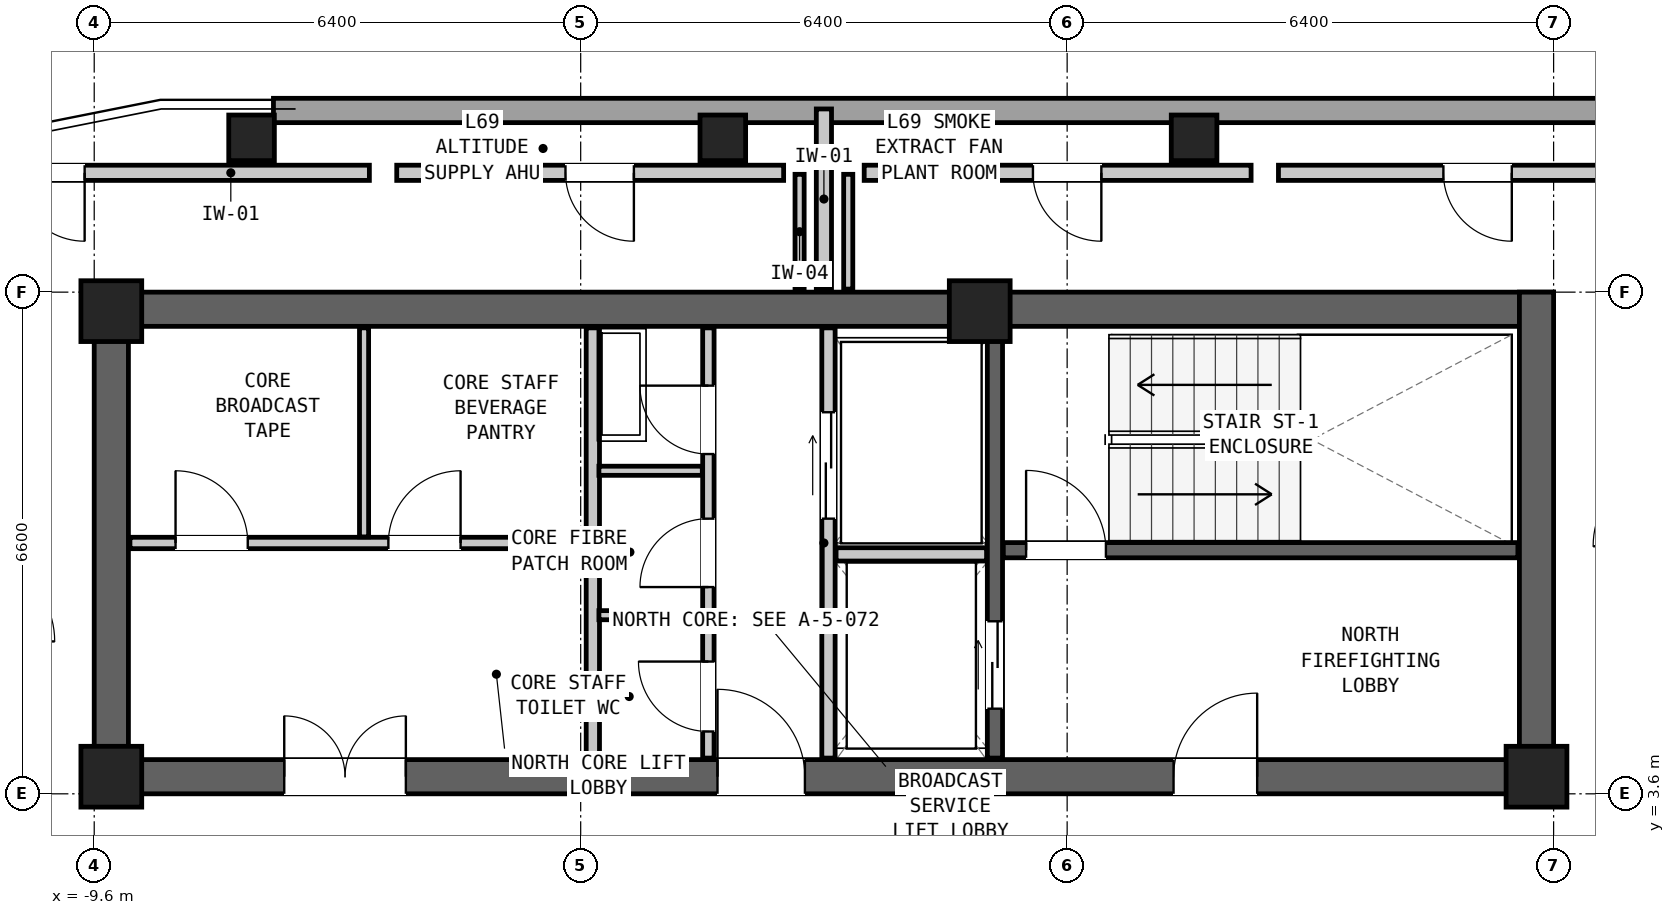
"""IFC4 building model, lengths in metres.
Left out: names, types, materials, properties, quantities, classifications, styles, units other than length and angle.
Written with IfcOpenShell. Run it as: python <this file> out.ifc"""

import sys

from ifc_helpers import new_model, si_unit, direction, frame, frame_2d, origin, origin_2d, place, context, subcontext, project, spatial, rectangle, hollow_rectangle, extrude, element, fill, save


model = new_model("IFC4")
c1 = context("Model", 3, precision=1e-05, world=origin(), true_north=direction((0.0, 1.0)))
c2 = subcontext(c1, "Body", "Model", "MODEL_VIEW")
j1 = project(units=[si_unit("LENGTHUNIT", "METRE"), si_unit("PLANEANGLEUNIT", "RADIAN")], contexts=[c1])
p1 = place(None, origin())
s1 = spatial("IfcSite", under=j1, at=p1, CompositionType="ELEMENT")
p2 = place(p1, origin())
s2 = spatial("IfcBuilding", under=s1, at=p2, CompositionType="ELEMENT")
p3 = place(p2, frame((0.0, 0.0, 234.9)))
s3 = spatial("IfcBuildingStorey", under=s2, at=p3, CompositionType="ELEMENT", Elevation=234.9)
p4 = place(p3, frame((-9.6, 9.975, 0.0), z_axis=(0.0, 0.0, 1.0), x_axis=(1.0, 0.0, 0.0)))
e1 = element("IfcWall", 1, at=p4, inside=s3, PredefinedType="SHEAR", context=c2, shape_type="SweptSolid", body=[
    extrude(rectangle(XDim=19.2, YDim=0.45, at=frame_2d((9.6, 0.0))), origin(), (0.0, 0.0, 1.0), 3.6),
])
p5 = place(p3, frame((-9.6, 3.825, 0.0), z_axis=(0.0, 0.0, 1.0), x_axis=(1.0, 0.0, 0.0)))
e2 = element("IfcWall", 2, at=p5, inside=s3, PredefinedType="SHEAR", context=c2, shape_type="SweptSolid", body=[
    extrude(rectangle(XDim=19.2, YDim=0.45, at=frame_2d((9.6, 0.0))), origin(), (0.0, 0.0, 1.0), 3.6),
])
p6 = place(p5, frame((14.2, 0.0, 0.0)))
e3 = element("IfcOpeningElement", 3, at=p6, cuts=e2, PredefinedType="OPENING", context=c2, shape_type="SweptSolid", body=[
    extrude(rectangle(XDim=1.1, YDim=2.08, at=frame_2d((0.55, 1.04))), frame((0.0, 0.237, 0.0), z_axis=(0.0, -1.0, 0.0), x_axis=(1.0, 0.0, 0.0)), (0.0, 0.0, 1.0), 0.474),
])
p7 = place(p5, frame((8.2, 0.0, 0.0)))
e4 = element("IfcOpeningElement", 4, at=p7, cuts=e2, PredefinedType="OPENING", context=c2, shape_type="SweptSolid", body=[
    extrude(rectangle(XDim=1.15, YDim=2.1, at=frame_2d((0.575, 1.05))), frame((0.0, 0.237, 0.0), z_axis=(0.0, -1.0, 0.0), x_axis=(1.0, 0.0, 0.0)), (0.0, 0.0, 1.0), 0.474),
])
p8 = place(p5, frame((2.5, 0.0, 0.0)))
e5 = element("IfcOpeningElement", 5, at=p8, cuts=e2, PredefinedType="OPENING", context=c2, shape_type="SweptSolid", body=[
    extrude(rectangle(XDim=1.6, YDim=2.12, at=frame_2d((0.8, 1.06))), frame((0.0, 0.237, 0.0), z_axis=(0.0, -1.0, 0.0), x_axis=(1.0, 0.0, 0.0)), (0.0, 0.0, 1.0), 0.474),
])
for number, where, z_axis, x_axis in (
    (6, (-9.375, 3.6, 0.0), (0.0, 0.0, 1.0), (0.0, 1.0, 0.0)),
    (7, (9.375, 3.6, 0.0), (0.0, 0.0, 1.0), (0.0, 1.0, 0.0)),
):
    element("IfcWall", number, at=place(p3, frame(where, z_axis=z_axis, x_axis=x_axis)), inside=s3, PredefinedType="SHEAR", context=c2, shape_type="SweptSolid", body=[
        extrude(rectangle(XDim=6.6, YDim=0.45, at=frame_2d((3.3, 0.0))), origin(), (0.0, 0.0, 1.0), 3.6),
    ])
for number, where, z_axis, x_axis in (
    (8, (4.87, 12.23, 0.0), (0.0, 0.0, 1.0), (1.0, 0.0, 0.0)),
    (9, (-1.33, 12.23, 0.0), (0.0, 0.0, 1.0), (1.0, 0.0, 0.0)),
    (10, (-7.53, 12.23, 0.0), (0.0, 0.0, 1.0), (1.0, 0.0, 0.0)),
):
    element("IfcColumn", number, at=place(p3, frame(where, z_axis=z_axis, x_axis=x_axis)), inside=s3, PredefinedType="COLUMN", context=c2, shape_type="SweptSolid", body=[
        extrude(hollow_rectangle(XDim=0.6, YDim=0.6, WallThickness=0.04, at=origin_2d()), origin(), (0.0, 0.0, 1.0), 3.6),
    ])
for number, where, z_axis, x_axis in (
    (11, (-9.375, 9.95, 0.0), (0.0, 0.0, 1.0), (1.0, 0.0, 0.0)),
    (12, (2.05, 9.95, 0.0), (0.0, 0.0, 1.0), (1.0, 0.0, 0.0)),
    (13, (-9.375, 3.825, 0.0), (0.0, 0.0, 1.0), (1.0, 0.0, 0.0)),
    (14, (9.375, 3.825, 0.0), (0.0, 0.0, 1.0), (1.0, 0.0, 0.0)),
):
    element("IfcColumn", number, at=place(p3, frame(where, z_axis=z_axis, x_axis=x_axis)), inside=s3, PredefinedType="COLUMN", context=c2, shape_type="SweptSolid", body=[
        extrude(rectangle(XDim=0.8, YDim=0.8, at=origin_2d()), origin(), (0.0, 0.0, 1.0), 3.6),
    ])
p9 = place(p3, frame((-7.242, 12.59, 0.0), z_axis=(0.0, 0.0, 1.0), x_axis=(1.0, 0.0, 0.0)))
e15 = element("IfcWall", 15, at=p9, inside=s3, PredefinedType="SOLIDWALL", context=c2, shape_type="SweptSolid", body=[
    extrude(rectangle(XDim=18.024, YDim=0.32, at=frame_2d((9.012, 0.0))), origin(), (0.0, 0.0, 1.0), 2.082),
])
p10 = place(p3, frame((2.36, 6.805, 0.0), z_axis=(0.0, 0.0, 1.0), x_axis=(1.0, 0.0, 0.0)))
e16 = element("IfcWall", 16, at=p10, inside=s3, PredefinedType="SHEAR", context=c2, shape_type="SweptSolid", body=[
    extrude(rectangle(XDim=6.77, YDim=0.2, at=frame_2d((3.385, 0.0))), origin(), (0.0, 0.0, 1.0), 3.22),
])
p11 = place(p10, frame((0.3, 0.0, 0.0)))
e17 = element("IfcOpeningElement", 17, at=p11, cuts=e16, PredefinedType="OPENING", context=c2, shape_type="SweptSolid", body=[
    extrude(rectangle(XDim=1.05, YDim=2.08, at=frame_2d((0.525, 1.04))), frame((0.0, 0.112, 0.0), z_axis=(0.0, -1.0, 0.0), x_axis=(1.0, 0.0, 0.0)), (0.0, 0.0, 1.0), 0.224),
])
p12 = place(p3, frame((2.25, 4.07, 0.0), z_axis=(0.0, 0.0, 1.0), x_axis=(0.0, 1.0, 0.0)))
e18 = element("IfcWall", 18, at=p12, inside=s3, PredefinedType="SHEAR", context=c2, shape_type="SweptSolid", body=[
    extrude(rectangle(XDim=5.66, YDim=0.2, at=frame_2d((2.83, 0.0))), origin(), (0.0, 0.0, 1.0), 3.22),
])
p13 = place(p12, frame((0.65, 0.0, 0.0)))
e19 = element("IfcOpeningElement", 19, at=p13, cuts=e18, PredefinedType="OPENING", context=c2, shape_type="SweptSolid", body=[
    extrude(rectangle(XDim=1.15, YDim=2.08, at=frame_2d((0.575, 1.04))), frame((0.0, 0.112, 0.0), z_axis=(0.0, -1.0, 0.0), x_axis=(1.0, 0.0, 0.0)), (0.0, 0.0, 1.0), 0.224),
])
p14 = place(p3, frame((0.06, 4.07, 0.0), z_axis=(0.0, 0.0, 1.0), x_axis=(0.0, 1.0, 0.0)))
e20 = element("IfcWall", 20, at=p14, inside=s3, PredefinedType="PARTITIONING", context=c2, shape_type="SweptSolid", body=[
    extrude(rectangle(XDim=5.66, YDim=0.175, at=frame_2d((2.83, 0.0))), origin(), (0.0, 0.0, 1.0), 3.22),
])
p15 = place(p14, frame((3.15, 0.0, 0.0)))
e21 = element("IfcOpeningElement", 21, at=p15, cuts=e20, PredefinedType="OPENING", context=c2, shape_type="SweptSolid", body=[
    extrude(rectangle(XDim=1.4, YDim=2.12, at=frame_2d((0.7, 1.06))), frame((0.0, 0.1, 0.0), z_axis=(0.0, -1.0, 0.0), x_axis=(1.0, 0.0, 0.0)), (0.0, 0.0, 1.0), 0.199),
])
p16 = place(p3, frame((0.16, 6.75, 0.0), z_axis=(0.0, 0.0, 1.0), x_axis=(1.0, 0.0, 0.0)))
e22 = element("IfcWall", 22, at=p16, inside=s3, PredefinedType="PARTITIONING", context=c2, shape_type="SweptSolid", body=[
    extrude(rectangle(XDim=1.98, YDim=0.175, at=frame_2d((0.99, 0.0))), origin(), (0.0, 0.0, 1.0), 3.22),
])
p17 = place(p3, frame((-3.04, 4.07, 0.0), z_axis=(0.0, 0.0, 1.0), x_axis=(0.0, 1.0, 0.0)))
e23 = element("IfcWall", 23, at=p17, inside=s3, PredefinedType="PARTITIONING", context=c2, shape_type="SweptSolid", body=[
    extrude(rectangle(XDim=5.66, YDim=0.175, at=frame_2d((2.83, 0.0))), origin(), (0.0, 0.0, 1.0), 3.22),
])
p18 = place(p3, frame((-1.52, 4.07, 0.0), z_axis=(0.0, 0.0, 1.0), x_axis=(0.0, 1.0, 0.0)))
e24 = element("IfcWall", 24, at=p18, inside=s3, PredefinedType="PARTITIONING", context=c2, shape_type="SweptSolid", body=[
    extrude(rectangle(XDim=5.66, YDim=0.15, at=frame_2d((2.83, 0.0))), origin(), (0.0, 0.0, 1.0), 3.22),
])
p19 = place(p18, frame((4.0, 0.0, 0.0)))
e25 = element("IfcOpeningElement", 25, at=p19, cuts=e24, PredefinedType="OPENING", context=c2, shape_type="SweptSolid", body=[
    extrude(rectangle(XDim=0.9, YDim=2.05, at=frame_2d((0.45, 1.025))), frame((0.0, 0.087, 0.0), z_axis=(0.0, -1.0, 0.0), x_axis=(1.0, 0.0, 0.0)), (0.0, 0.0, 1.0), 0.174),
])
p20 = place(p18, frame((2.25, 0.0, 0.0)))
e26 = element("IfcOpeningElement", 26, at=p20, cuts=e24, PredefinedType="OPENING", context=c2, shape_type="SweptSolid", body=[
    extrude(rectangle(XDim=0.9, YDim=2.05, at=frame_2d((0.45, 1.025))), frame((0.0, 0.087, 0.0), z_axis=(0.0, -1.0, 0.0), x_axis=(1.0, 0.0, 0.0)), (0.0, 0.0, 1.0), 0.174),
])
p21 = place(p18, frame((0.35, 0.0, 0.0)))
e27 = element("IfcOpeningElement", 27, at=p21, cuts=e24, PredefinedType="OPENING", context=c2, shape_type="SweptSolid", body=[
    extrude(rectangle(XDim=0.92, YDim=2.1, at=frame_2d((0.46, 1.05))), frame((0.0, 0.087, 0.0), z_axis=(0.0, -1.0, 0.0), x_axis=(1.0, 0.0, 0.0)), (0.0, 0.0, 1.0), 0.174),
])
for number, where, z_axis, x_axis in (
    (28, (-2.96, 5.95, 0.0), (0.0, 0.0, 1.0), (1.0, 0.0, 0.0)),
    (29, (-2.96, 7.85, 0.0), (0.0, 0.0, 1.0), (1.0, 0.0, 0.0)),
):
    element("IfcWall", number, at=place(p3, frame(where, z_axis=z_axis, x_axis=x_axis)), inside=s3, PredefinedType="PARTITIONING", context=c2, shape_type="SweptSolid", body=[
        extrude(rectangle(XDim=1.36, YDim=0.12, at=frame_2d((0.68, 0.0))), origin(), (0.0, 0.0, 1.0), 3.22),
    ])
p22 = place(p3, frame((-9.13, 6.9, 0.0), z_axis=(0.0, 0.0, 1.0), x_axis=(1.0, 0.0, 0.0)))
e30 = element("IfcWall", 30, at=p22, inside=s3, PredefinedType="PARTITIONING", context=c2, shape_type="SweptSolid", body=[
    extrude(rectangle(XDim=6.01, YDim=0.15, at=frame_2d((3.005, 0.0))), origin(), (0.0, 0.0, 1.0), 3.22),
])
p23 = place(p22, frame((0.6, 0.0, 0.0)))
e31 = element("IfcOpeningElement", 31, at=p23, cuts=e30, PredefinedType="OPENING", context=c2, shape_type="SweptSolid", body=[
    extrude(rectangle(XDim=0.95, YDim=2.1, at=frame_2d((0.475, 1.05))), frame((0.0, 0.087, 0.0), z_axis=(0.0, -1.0, 0.0), x_axis=(1.0, 0.0, 0.0)), (0.0, 0.0, 1.0), 0.174),
])
p24 = place(p22, frame((3.4, 0.0, 0.0)))
e32 = element("IfcOpeningElement", 32, at=p24, cuts=e30, PredefinedType="OPENING", context=c2, shape_type="SweptSolid", body=[
    extrude(rectangle(XDim=0.95, YDim=2.1, at=frame_2d((0.475, 1.05))), frame((0.0, 0.087, 0.0), z_axis=(0.0, -1.0, 0.0), x_axis=(1.0, 0.0, 0.0)), (0.0, 0.0, 1.0), 0.174),
])
p25 = place(p3, frame((-6.05, 6.98, 0.0), z_axis=(0.0, 0.0, 1.0), x_axis=(0.0, 1.0, 0.0)))
e33 = element("IfcWall", 33, at=p25, inside=s3, PredefinedType="PARTITIONING", context=c2, shape_type="SweptSolid", body=[
    extrude(rectangle(XDim=2.75, YDim=0.12, at=frame_2d((1.375, 0.0))), origin(), (0.0, 0.0, 1.0), 3.22),
])
p26 = place(p3, frame((0.0, 10.24, 0.0), z_axis=(0.0, 0.0, 1.0), x_axis=(0.0, 1.0, 0.0)))
e34 = element("IfcWall", 34, at=p26, inside=s3, PredefinedType="PARTITIONING", context=c2, shape_type="SweptSolid", body=[
    extrude(rectangle(XDim=2.37, YDim=0.2, at=frame_2d((1.185, 0.0))), origin(), (0.0, 0.0, 1.0), 2.438),
])
for number, where, z_axis, x_axis in (
    (35, (-0.32, 10.24, 0.0), (0.0, 0.0, 1.0), (0.0, 1.0, 0.0)),
    (36, (0.32, 10.24, 0.0), (0.0, 0.0, 1.0), (0.0, 1.0, 0.0)),
):
    element("IfcWall", number, at=place(p3, frame(where, z_axis=z_axis, x_axis=x_axis)), inside=s3, PredefinedType="PARTITIONING", context=c2, shape_type="SweptSolid", body=[
        extrude(rectangle(XDim=1.51, YDim=0.12, at=frame_2d((0.755, 0.0))), origin(), (0.0, 0.0, 1.0), 2.438),
    ])
p27 = place(p3, frame((-5.98, 11.77, 0.0), z_axis=(0.0, 0.0, 1.0), x_axis=(-1.0, 0.0, 0.0)))
e37 = element("IfcWall", 37, at=p27, inside=s3, PredefinedType="PARTITIONING", context=c2, shape_type="SweptSolid", body=[
    extrude(rectangle(XDim=5.046, YDim=0.2, at=frame_2d((2.523, 0.0))), origin(), (0.0, 0.0, 1.0), 2.082),
])
p28 = place(p27, frame((3.746, 0.0, 0.0)))
e38 = element("IfcOpeningElement", 38, at=p28, cuts=e37, PredefinedType="OPENING", context=c2, shape_type="SweptSolid", body=[
    extrude(rectangle(XDim=0.9, YDim=2.05, at=frame_2d((0.45, 1.025))), frame((0.0, 0.112, 0.0), z_axis=(0.0, -1.0, 0.0), x_axis=(1.0, 0.0, 0.0)), (0.0, 0.0, 1.0), 0.224),
])
p29 = place(p3, frame((-0.53, 11.77, 0.0), z_axis=(0.0, 0.0, 1.0), x_axis=(-1.0, 0.0, 0.0)))
e39 = element("IfcWall", 39, at=p29, inside=s3, PredefinedType="PARTITIONING", context=c2, shape_type="SweptSolid", body=[
    extrude(rectangle(XDim=5.09, YDim=0.2, at=frame_2d((2.545, 0.0))), origin(), (0.0, 0.0, 1.0), 2.082),
])
p30 = place(p29, frame((1.97, 0.0, 0.0)))
e40 = element("IfcOpeningElement", 40, at=p30, cuts=e39, PredefinedType="OPENING", context=c2, shape_type="SweptSolid", body=[
    extrude(rectangle(XDim=0.9, YDim=2.05, at=frame_2d((0.45, 1.025))), frame((0.0, 0.112, 0.0), z_axis=(0.0, -1.0, 0.0), x_axis=(1.0, 0.0, 0.0)), (0.0, 0.0, 1.0), 0.224),
])
p31 = place(p3, frame((5.62, 11.77, 0.0), z_axis=(0.0, 0.0, 1.0), x_axis=(-1.0, 0.0, 0.0)))
e41 = element("IfcWall", 41, at=p31, inside=s3, PredefinedType="PARTITIONING", context=c2, shape_type="SweptSolid", body=[
    extrude(rectangle(XDim=5.09, YDim=0.2, at=frame_2d((2.545, 0.0))), origin(), (0.0, 0.0, 1.0), 2.082),
])
p32 = place(p31, frame((1.97, 0.0, 0.0)))
e42 = element("IfcOpeningElement", 42, at=p32, cuts=e41, PredefinedType="OPENING", context=c2, shape_type="SweptSolid", body=[
    extrude(rectangle(XDim=0.9, YDim=2.05, at=frame_2d((0.45, 1.025))), frame((0.0, 0.112, 0.0), z_axis=(0.0, -1.0, 0.0), x_axis=(1.0, 0.0, 0.0)), (0.0, 0.0, 1.0), 0.224),
])
p33 = place(p3, frame((10.97, 11.77, 0.0), z_axis=(0.0, 0.0, 1.0), x_axis=(-1.0, 0.0, 0.0)))
e43 = element("IfcWall", 43, at=p33, inside=s3, PredefinedType="PARTITIONING", context=c2, shape_type="SweptSolid", body=[
    extrude(rectangle(XDim=4.99, YDim=0.2, at=frame_2d((2.495, 0.0))), origin(), (0.0, 0.0, 1.0), 2.082),
])
p34 = place(p33, frame((1.92, 0.0, 0.0)))
e44 = element("IfcOpeningElement", 44, at=p34, cuts=e43, PredefinedType="OPENING", context=c2, shape_type="SweptSolid", body=[
    extrude(rectangle(XDim=0.9, YDim=2.05, at=frame_2d((0.45, 1.025))), frame((0.0, 0.112, 0.0), z_axis=(0.0, -1.0, 0.0), x_axis=(1.0, 0.0, 0.0)), (0.0, 0.0, 1.0), 0.224),
])
p35 = place(p11, origin())
e45 = element("IfcDoor", 45, at=p35, inside=s3, OperationType="SINGLE_SWING_LEFT", PredefinedType="DOOR", context=c2, shape_type="SweptSolid", body=[
    extrude(rectangle(XDim=1.05, YDim=2.08, at=frame_2d((0.525, 1.04))), frame((0.0, 0.025, 0.0), z_axis=(0.0, -1.0, 0.0), x_axis=(1.0, 0.0, 0.0)), (0.0, 0.0, 1.0), 0.05),
])
fill(e17, e45)
p36 = place(p6, origin())
e46 = element("IfcDoor", 46, at=p36, inside=s3, OperationType="SINGLE_SWING_RIGHT", PredefinedType="DOOR", context=c2, shape_type="SweptSolid", body=[
    extrude(rectangle(XDim=1.1, YDim=2.08, at=frame_2d((0.55, 1.04))), frame((0.0, 0.025, 0.0), z_axis=(0.0, -1.0, 0.0), x_axis=(1.0, 0.0, 0.0)), (0.0, 0.0, 1.0), 0.05),
])
fill(e3, e46)
p37 = place(p13, origin())
e47 = element("IfcDoor", 47, at=p37, inside=s3, OperationType="DOUBLE_DOOR_SLIDING", PredefinedType="DOOR", context=c2, shape_type="SweptSolid", body=[
    extrude(rectangle(XDim=1.15, YDim=2.08, at=frame_2d((0.575, 1.04))), frame((0.0, 0.025, 0.0), z_axis=(0.0, -1.0, 0.0), x_axis=(1.0, 0.0, 0.0)), (0.0, 0.0, 1.0), 0.05),
])
fill(e19, e47)
p38 = place(p15, origin())
e48 = element("IfcDoor", 48, at=p38, inside=s3, OperationType="DOUBLE_DOOR_SLIDING", PredefinedType="DOOR", context=c2, shape_type="SweptSolid", body=[
    extrude(rectangle(XDim=1.4, YDim=2.12, at=frame_2d((0.7, 1.06))), frame((0.0, 0.025, 0.0), z_axis=(0.0, -1.0, 0.0), x_axis=(1.0, 0.0, 0.0)), (0.0, 0.0, 1.0), 0.05),
])
fill(e21, e48)
p39 = place(p7, origin())
e49 = element("IfcDoor", 49, at=p39, inside=s3, OperationType="SINGLE_SWING_LEFT", PredefinedType="DOOR", context=c2, shape_type="SweptSolid", body=[
    extrude(rectangle(XDim=1.15, YDim=2.1, at=frame_2d((0.575, 1.05))), frame((0.0, 0.025, 0.0), z_axis=(0.0, -1.0, 0.0), x_axis=(1.0, 0.0, 0.0)), (0.0, 0.0, 1.0), 0.05),
])
fill(e4, e49)
p40 = place(p19, origin())
e50 = element("IfcDoor", 50, at=p40, inside=s3, OperationType="SINGLE_SWING_RIGHT", PredefinedType="DOOR", context=c2, shape_type="SweptSolid", body=[
    extrude(rectangle(XDim=0.9, YDim=2.05, at=frame_2d((0.45, 1.025))), frame((0.0, 0.025, 0.0), z_axis=(0.0, -1.0, 0.0), x_axis=(1.0, 0.0, 0.0)), (0.0, 0.0, 1.0), 0.05),
])
fill(e25, e50)
p41 = place(p20, origin())
e51 = element("IfcDoor", 51, at=p41, inside=s3, OperationType="SINGLE_SWING_LEFT", PredefinedType="DOOR", context=c2, shape_type="SweptSolid", body=[
    extrude(rectangle(XDim=0.9, YDim=2.05, at=frame_2d((0.45, 1.025))), frame((0.0, 0.025, 0.0), z_axis=(0.0, -1.0, 0.0), x_axis=(1.0, 0.0, 0.0)), (0.0, 0.0, 1.0), 0.05),
])
fill(e26, e51)
p42 = place(p21, origin())
e52 = element("IfcDoor", 52, at=p42, inside=s3, OperationType="SINGLE_SWING_RIGHT", PredefinedType="DOOR", context=c2, shape_type="SweptSolid", body=[
    extrude(rectangle(XDim=0.92, YDim=2.1, at=frame_2d((0.46, 1.05))), frame((0.0, 0.025, 0.0), z_axis=(0.0, -1.0, 0.0), x_axis=(1.0, 0.0, 0.0)), (0.0, 0.0, 1.0), 0.05),
])
fill(e27, e52)
p43 = place(p8, origin())
e53 = element("IfcDoor", 53, at=p43, inside=s3, OperationType="DOUBLE_DOOR_SINGLE_SWING", PredefinedType="DOOR", context=c2, shape_type="SweptSolid", body=[
    extrude(rectangle(XDim=1.6, YDim=2.12, at=frame_2d((0.8, 1.06))), frame((0.0, 0.025, 0.0), z_axis=(0.0, -1.0, 0.0), x_axis=(1.0, 0.0, 0.0)), (0.0, 0.0, 1.0), 0.05),
])
fill(e5, e53)
p44 = place(p23, origin())
e54 = element("IfcDoor", 54, at=p44, inside=s3, OperationType="SINGLE_SWING_LEFT", PredefinedType="DOOR", context=c2, shape_type="SweptSolid", body=[
    extrude(rectangle(XDim=0.95, YDim=2.1, at=frame_2d((0.475, 1.05))), frame((0.0, 0.025, 0.0), z_axis=(0.0, -1.0, 0.0), x_axis=(1.0, 0.0, 0.0)), (0.0, 0.0, 1.0), 0.05),
])
fill(e31, e54)
p45 = place(p24, origin())
e55 = element("IfcDoor", 55, at=p45, inside=s3, OperationType="SINGLE_SWING_RIGHT", PredefinedType="DOOR", context=c2, shape_type="SweptSolid", body=[
    extrude(rectangle(XDim=0.95, YDim=2.1, at=frame_2d((0.475, 1.05))), frame((0.0, 0.025, 0.0), z_axis=(0.0, -1.0, 0.0), x_axis=(1.0, 0.0, 0.0)), (0.0, 0.0, 1.0), 0.05),
])
fill(e32, e55)
p46 = place(p28, origin())
e56 = element("IfcDoor", 56, at=p46, inside=s3, OperationType="SINGLE_SWING_LEFT", PredefinedType="DOOR", context=c2, shape_type="SweptSolid", body=[
    extrude(rectangle(XDim=0.9, YDim=2.05, at=frame_2d((0.45, 1.025))), frame((0.0, 0.025, 0.0), z_axis=(0.0, -1.0, 0.0), x_axis=(1.0, 0.0, 0.0)), (0.0, 0.0, 1.0), 0.05),
])
fill(e38, e56)
p47 = place(p30, origin())
e57 = element("IfcDoor", 57, at=p47, inside=s3, OperationType="SINGLE_SWING_LEFT", PredefinedType="DOOR", context=c2, shape_type="SweptSolid", body=[
    extrude(rectangle(XDim=0.9, YDim=2.05, at=frame_2d((0.45, 1.025))), frame((0.0, 0.025, 0.0), z_axis=(0.0, -1.0, 0.0), x_axis=(1.0, 0.0, 0.0)), (0.0, 0.0, 1.0), 0.05),
])
fill(e40, e57)
p48 = place(p32, origin())
e58 = element("IfcDoor", 58, at=p48, inside=s3, OperationType="SINGLE_SWING_LEFT", PredefinedType="DOOR", context=c2, shape_type="SweptSolid", body=[
    extrude(rectangle(XDim=0.9, YDim=2.05, at=frame_2d((0.45, 1.025))), frame((0.0, 0.025, 0.0), z_axis=(0.0, -1.0, 0.0), x_axis=(1.0, 0.0, 0.0)), (0.0, 0.0, 1.0), 0.05),
])
fill(e42, e58)
p49 = place(p34, origin())
e59 = element("IfcDoor", 59, at=p49, inside=s3, OperationType="SINGLE_SWING_LEFT", PredefinedType="DOOR", context=c2, shape_type="SweptSolid", body=[
    extrude(rectangle(XDim=0.9, YDim=2.05, at=frame_2d((0.45, 1.025))), frame((0.0, 0.025, 0.0), z_axis=(0.0, -1.0, 0.0), x_axis=(1.0, 0.0, 0.0)), (0.0, 0.0, 1.0), 0.05),
])
fill(e44, e59)
save(model, sys.argv[1])
